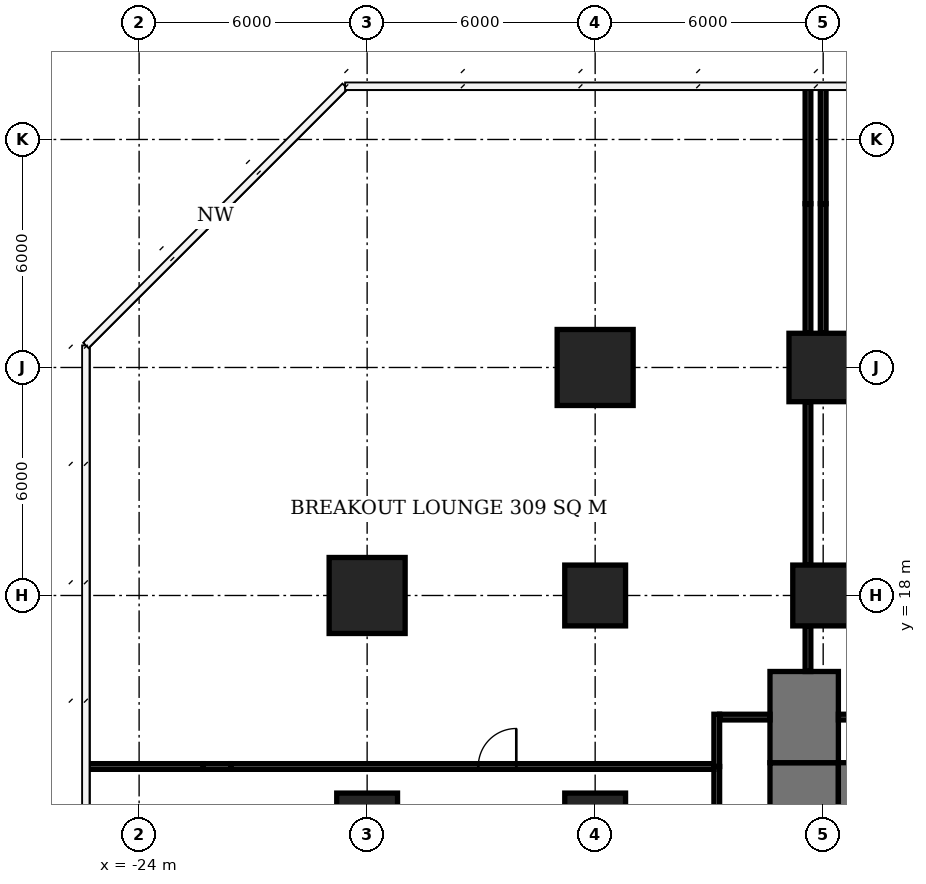
"""IFC4 building model, lengths in metres.
Left out: names, types, materials, properties, quantities, classifications, styles, units other than length and angle.
Written with IfcOpenShell. Run it as: python <this file> out.ifc"""

import sys

from ifc_helpers import new_model, si_unit, direction, frame, frame_2d, origin, origin_2d, place, context, subcontext, project, spatial, rectangle, extrude, element, fill, save


model = new_model("IFC4")
c1 = context("Model", 3, precision=1e-05, world=origin(), true_north=direction((0.0, 1.0)))
c2 = subcontext(c1, "Body", "Model", "MODEL_VIEW")
j1 = project(units=[si_unit("LENGTHUNIT", "METRE"), si_unit("PLANEANGLEUNIT", "RADIAN")], contexts=[c1])
p1 = place(None, origin())
s1 = spatial("IfcSite", under=j1, at=p1, CompositionType="ELEMENT")
p2 = place(p1, origin())
s2 = spatial("IfcBuilding", under=s1, at=p2, CompositionType="ELEMENT")
p3 = place(p2, frame((0.0, 0.0, 93.8)))
s3 = spatial("IfcBuildingStorey", under=s2, at=p3, CompositionType="ELEMENT", Elevation=93.8)
p4 = place(p3, frame((-18.0, 12.0, 0.0), z_axis=(0.0, 0.0, 1.0), x_axis=(1.0, 0.0, 0.0)))
e1 = element("IfcColumn", 1, at=p4, inside=s3, PredefinedType="COLUMN", context=c2, shape_type="SweptSolid", body=[
    extrude(rectangle(XDim=1.6, YDim=1.6, at=origin_2d()), origin(), (0.0, 0.0, 1.0), 3.9),
])
p5 = place(p3, frame((-18.0, 18.0, 0.0), z_axis=(0.0, 0.0, 1.0), x_axis=(1.0, 0.0, 0.0)))
e2 = element("IfcColumn", 2, at=p5, inside=s3, PredefinedType="COLUMN", context=c2, shape_type="SweptSolid", body=[
    extrude(rectangle(XDim=2.0, YDim=2.0, at=origin_2d()), origin(), (0.0, 0.0, 1.0), 3.9),
])
for number, where, z_axis, x_axis in (
    (3, (-12.0, 12.0, 0.0), (0.0, 0.0, 1.0), (1.0, 0.0, 0.0)),
    (4, (-12.0, 18.0, 0.0), (0.0, 0.0, 1.0), (1.0, 0.0, 0.0)),
):
    element("IfcColumn", number, at=place(p3, frame(where, z_axis=z_axis, x_axis=x_axis)), inside=s3, PredefinedType="COLUMN", context=c2, shape_type="SweptSolid", body=[
        extrude(rectangle(XDim=1.6, YDim=1.6, at=origin_2d()), origin(), (0.0, 0.0, 1.0), 3.9),
    ])
p6 = place(p3, frame((-12.0, 24.0, 0.0), z_axis=(0.0, 0.0, 1.0), x_axis=(1.0, 0.0, 0.0)))
e5 = element("IfcColumn", 5, at=p6, inside=s3, PredefinedType="COLUMN", context=c2, shape_type="SweptSolid", body=[
    extrude(rectangle(XDim=2.0, YDim=2.0, at=origin_2d()), origin(), (0.0, 0.0, 1.0), 3.9),
])
p7 = place(p3, frame((-6.0, 18.0, 0.0), z_axis=(0.0, 0.0, 1.0), x_axis=(1.0, 0.0, 0.0)))
e6 = element("IfcColumn", 6, at=p7, inside=s3, PredefinedType="COLUMN", context=c2, shape_type="SweptSolid", body=[
    extrude(rectangle(XDim=1.6, YDim=1.6, at=origin_2d()), origin(), (0.0, 0.0, 1.0), 3.9),
])
p8 = place(p3, frame((-6.0, 24.0, 0.0), z_axis=(0.0, 0.0, 1.0), x_axis=(1.0, 0.0, 0.0)))
e7 = element("IfcColumn", 7, at=p8, inside=s3, PredefinedType="COLUMN", context=c2, shape_type="SweptSolid", body=[
    extrude(rectangle(XDim=1.8, YDim=1.8, at=origin_2d()), origin(), (0.0, 0.0, 1.0), 3.9),
])
p9 = place(p3, frame((-5.6, 12.6, 0.0), z_axis=(0.0, 0.0, 1.0), x_axis=(1.0, 0.0, 0.0)))
e8 = element("IfcWall", 8, at=p9, inside=s3, PredefinedType="SHEAR", context=c2, shape_type="SweptSolid", body=[
    extrude(rectangle(XDim=23.2, YDim=2.0, at=frame_2d((11.6, 0.0))), origin(), (0.0, 0.0, 1.0), 3.9),
])
p10 = place(p3, frame((-6.5, -7.6, 0.0), z_axis=(0.0, 0.0, 1.0), x_axis=(0.0, 1.0, 0.0)))
e9 = element("IfcWall", 9, at=p10, inside=s3, PredefinedType="SHEAR", context=c2, shape_type="SweptSolid", body=[
    extrude(rectangle(XDim=21.2, YDim=1.8, at=frame_2d((10.6, 0.0))), origin(), (0.0, 0.0, 1.0), 3.9),
])
p11 = place(p10, frame((7.8, 0.0, 0.0)))
e10 = element("IfcOpeningElement", 10, at=p11, cuts=e9, PredefinedType="OPENING", context=c2, shape_type="SweptSolid", body=[
    extrude(rectangle(XDim=1.8, YDim=2.4, at=frame_2d((0.9, 1.2))), frame((0.0, 0.91, 0.0), z_axis=(0.0, -1.0, 0.0), x_axis=(1.0, 0.0, 0.0)), (0.0, 0.0, 1.0), 1.82),
])
p12 = place(p3, frame((-6.5, 13.6, 0.0), z_axis=(0.0, 0.0, 1.0), x_axis=(0.0, 1.0, 0.0)))
e11 = element("IfcWall", 11, at=p12, inside=s3, PredefinedType="SHEAR", context=c2, shape_type="SweptSolid", body=[
    extrude(rectangle(XDim=2.4, YDim=1.8, at=frame_2d((1.2, 0.0))), origin(), (0.0, 0.0, 1.0), 3.9),
])
p13 = place(p3, frame((-6.0, 24.9, 0.0), z_axis=(0.0, 0.0, 1.0), x_axis=(0.0, 1.0, 0.0)))
e12 = element("IfcWall", 12, at=p13, inside=s3, PredefinedType="PARTITIONING", context=c2, shape_type="SweptSolid", body=[
    extrude(rectangle(XDim=3.41, YDim=0.15, at=frame_2d((1.705, 0.0))), origin(), (0.0, 0.0, 1.0), 2.65),
])
for number, where, z_axis, x_axis in (
    (13, (-6.0, 28.31, 0.0), (0.0, 0.0, 1.0), (0.0, 1.0, 0.0)),
    (14, (-25.375, 13.5, 0.0), (0.0, 0.0, 1.0), (1.0, 0.0, 0.0)),
):
    element("IfcWall", number, at=place(p3, frame(where, z_axis=z_axis, x_axis=x_axis)), inside=s3, PredefinedType="PARTITIONING", context=c2, shape_type="SweptSolid", body=[
        extrude(rectangle(XDim=3.065, YDim=0.15, at=frame_2d((1.532, 0.0))), origin(), (0.0, 0.0, 1.0), 3.65),
    ])
p14 = place(p3, frame((-22.31, 13.5, 0.0), z_axis=(0.0, 0.0, 1.0), x_axis=(1.0, 0.0, 0.0)))
e15 = element("IfcWall", 15, at=p14, inside=s3, PredefinedType="PARTITIONING", context=c2, shape_type="SweptSolid", body=[
    extrude(rectangle(XDim=0.72, YDim=0.15, at=frame_2d((0.36, 0.0))), origin(), (0.0, 0.0, 1.0), 2.65),
])
p15 = place(p3, frame((-21.59, 13.5, 0.0), z_axis=(0.0, 0.0, 1.0), x_axis=(1.0, 0.0, 0.0)))
e16 = element("IfcWall", 16, at=p15, inside=s3, PredefinedType="PARTITIONING", context=c2, shape_type="SweptSolid", body=[
    extrude(rectangle(XDim=12.715, YDim=0.15, at=frame_2d((6.357, 0.0))), origin(), (0.0, 0.0, 1.0), 3.65),
])
p16 = place(p15, frame((6.515, 0.0, 0.0)))
e17 = element("IfcOpeningElement", 17, at=p16, cuts=e16, PredefinedType="OPENING", context=c2, shape_type="SweptSolid", body=[
    extrude(rectangle(XDim=1.0, YDim=2.1, at=frame_2d((0.5, 1.05))), frame((0.0, 0.085, 0.0), z_axis=(0.0, -1.0, 0.0), x_axis=(1.0, 0.0, 0.0)), (0.0, 0.0, 1.0), 0.17),
])
p17 = place(p3, frame((-8.8, 6.075, 0.0), z_axis=(0.0, 0.0, 1.0), x_axis=(0.0, 1.0, 0.0)))
e18 = element("IfcWall", 18, at=p17, inside=s3, PredefinedType="PARTITIONING", context=c2, shape_type="SweptSolid", body=[
    extrude(rectangle(XDim=7.425, YDim=0.15, at=frame_2d((3.712, 0.0))), origin(), (0.0, 0.0, 1.0), 3.65),
])
p18 = place(p17, frame((2.099, 0.0, 0.0)))
e19 = element("IfcOpeningElement", 19, at=p18, cuts=e18, PredefinedType="OPENING", context=c2, shape_type="SweptSolid", body=[
    extrude(rectangle(XDim=1.0, YDim=2.1, at=frame_2d((0.5, 1.05))), frame((0.0, 0.085, 0.0), z_axis=(0.0, -1.0, 0.0), x_axis=(1.0, 0.0, 0.0)), (0.0, 0.0, 1.0), 0.17),
])
p19 = place(p3, frame((-8.8, 13.5, 0.0), z_axis=(0.0, 0.0, 1.0), x_axis=(0.0, 1.0, 0.0)))
e20 = element("IfcWall", 20, at=p19, inside=s3, PredefinedType="PARTITIONING", context=c2, shape_type="SweptSolid", body=[
    extrude(rectangle(XDim=1.375, YDim=0.15, at=frame_2d((0.688, 0.0))), origin(), (0.0, 0.0, 1.0), 3.65),
])
p20 = place(p3, frame((-8.725, 14.8, 0.0), z_axis=(0.0, 0.0, 1.0), x_axis=(1.0, 0.0, 0.0)))
e21 = element("IfcWall", 21, at=p20, inside=s3, PredefinedType="PARTITIONING", context=c2, shape_type="SweptSolid", body=[
    extrude(rectangle(XDim=1.325, YDim=0.15, at=frame_2d((0.663, 0.0))), origin(), (0.0, 0.0, 1.0), 3.65),
])
p21 = place(p3, frame((-6.4, 16.0, 0.0), z_axis=(0.0, 0.0, 1.0), x_axis=(0.0, 1.0, 0.0)))
e22 = element("IfcWall", 22, at=p21, inside=s3, PredefinedType="PARTITIONING", context=c2, shape_type="SweptSolid", body=[
    extrude(rectangle(XDim=1.2, YDim=0.15, at=frame_2d((0.6, 0.0))), origin(), (0.0, 0.0, 1.0), 3.65),
])
p22 = place(p3, frame((-6.4, 18.8, 0.0), z_axis=(0.0, 0.0, 1.0), x_axis=(0.0, 1.0, 0.0)))
e23 = element("IfcWall", 23, at=p22, inside=s3, PredefinedType="PARTITIONING", context=c2, shape_type="SweptSolid", body=[
    extrude(rectangle(XDim=4.3, YDim=0.15, at=frame_2d((2.15, 0.0))), origin(), (0.0, 0.0, 1.0), 3.65),
])
p23 = place(p3, frame((-6.4, 24.9, 0.0), z_axis=(0.0, 0.0, 1.0), x_axis=(0.0, 1.0, 0.0)))
e24 = element("IfcWall", 24, at=p23, inside=s3, PredefinedType="PARTITIONING", context=c2, shape_type="SweptSolid", body=[
    extrude(rectangle(XDim=3.41, YDim=0.15, at=frame_2d((1.705, 0.0))), origin(), (0.0, 0.0, 1.0), 2.65),
])
p24 = place(p3, frame((-6.4, 28.31, 0.0), z_axis=(0.0, 0.0, 1.0), x_axis=(0.0, 1.0, 0.0)))
e25 = element("IfcWall", 25, at=p24, inside=s3, PredefinedType="PARTITIONING", context=c2, shape_type="SweptSolid", body=[
    extrude(rectangle(XDim=3.065, YDim=0.15, at=frame_2d((1.532, 0.0))), origin(), (0.0, 0.0, 1.0), 3.65),
])
p25 = place(p3, frame((-5.6, 14.8, 0.0), z_axis=(0.0, 0.0, 1.0), x_axis=(1.0, 0.0, 0.0)))
e26 = element("IfcWall", 26, at=p25, inside=s3, PredefinedType="PARTITIONING", context=c2, shape_type="SweptSolid", body=[
    extrude(rectangle(XDim=16.025, YDim=0.15, at=frame_2d((8.013, 0.0))), origin(), (0.0, 0.0, 1.0), 3.65),
])
p26 = place(p25, frame((9.965, 0.0, 0.0)))
e27 = element("IfcOpeningElement", 27, at=p26, cuts=e26, PredefinedType="OPENING", context=c2, shape_type="SweptSolid", body=[
    extrude(rectangle(XDim=1.0, YDim=2.1, at=frame_2d((0.5, 1.05))), frame((0.0, 0.085, 0.0), z_axis=(0.0, -1.0, 0.0), x_axis=(1.0, 0.0, 0.0)), (0.0, 0.0, 1.0), 0.17),
])
p27 = place(p16, origin())
e28 = element("IfcDoor", 28, at=p27, inside=s3, OperationType="SINGLE_SWING_RIGHT", PredefinedType="DOOR", context=c2, shape_type="SweptSolid", body=[
    extrude(rectangle(XDim=1.0, YDim=2.1, at=frame_2d((0.5, 1.05))), frame((0.0, 0.025, 0.0), z_axis=(0.0, -1.0, 0.0), x_axis=(1.0, 0.0, 0.0)), (0.0, 0.0, 1.0), 0.05),
])
fill(e17, e28)
save(model, sys.argv[1])
